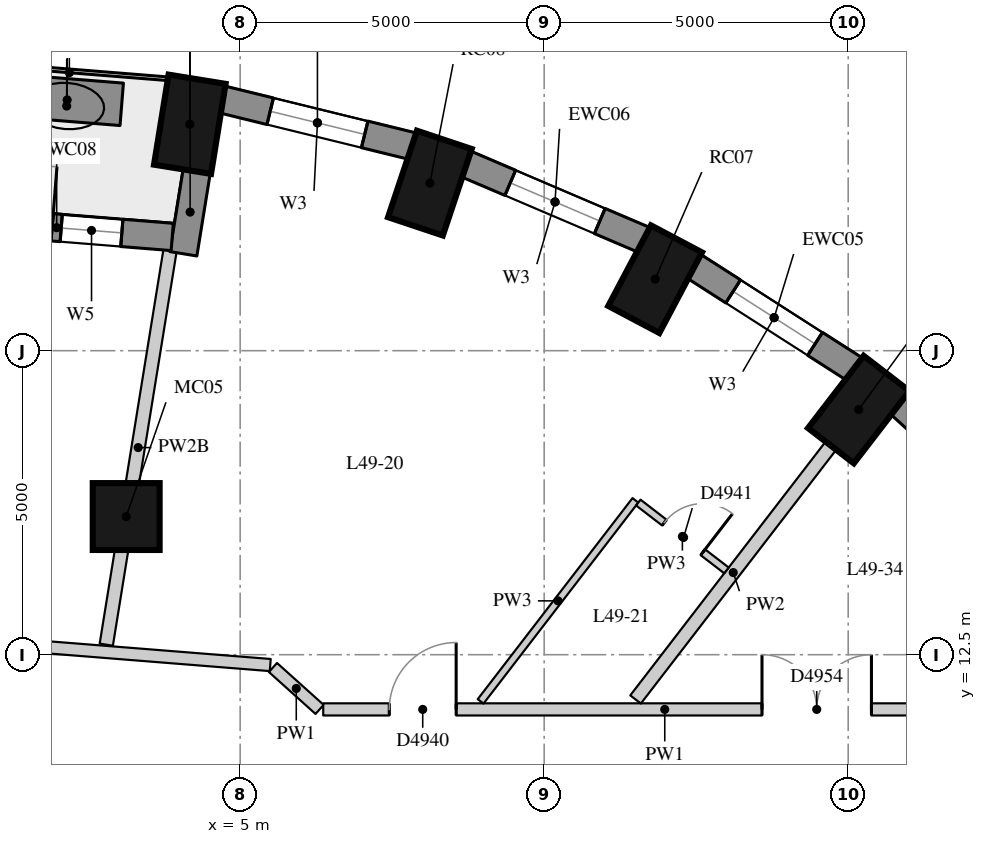
"""IFC4 building model, lengths in metres.
Left out: names, types, materials, properties, quantities, classifications, styles, units other than length and angle.
Written with IfcOpenShell. Run it as: python <this file> out.ifc"""

import sys

from ifc_helpers import new_model, si_unit, direction, frame, frame_2d, origin, origin_2d, place, context, subcontext, project, spatial, rectangle, extrude, element, fill, save


model = new_model("IFC4")
c1 = context("Model", 3, precision=1e-05, world=origin(), true_north=direction((0.0, 1.0)))
c2 = subcontext(c1, "Body", "Model", "MODEL_VIEW")
j1 = project(units=[si_unit("LENGTHUNIT", "METRE"), si_unit("PLANEANGLEUNIT", "RADIAN")], contexts=[c1])
p1 = place(None, origin())
s1 = spatial("IfcSite", under=j1, at=p1, CompositionType="ELEMENT")
p2 = place(p1, origin())
s2 = spatial("IfcBuilding", under=s1, at=p2, CompositionType="ELEMENT")
p3 = place(p2, frame((0.0, 0.0, 174.8)))
s3 = spatial("IfcBuildingStorey", under=s2, at=p3, CompositionType="ELEMENT", Elevation=174.8)
for number, where, z_axis, x_axis in (
    (1, (15.173, 16.532, 0.0), (0.0, 0.0, 1.0), (0.61, 0.792, 0.0)),
    (2, (11.825, 18.676, 0.0), (0.0, 0.0, 1.0), (0.468, 0.884, 0.0)),
    (3, (8.12, 20.256, 0.0), (0.0, 0.0, 1.0), (0.317, 0.949, 0.0)),
    (4, (4.172, 21.224, 0.0), (0.0, 0.0, 1.0), (0.16, 0.987, 0.0)),
):
    element("IfcColumn", number, at=place(p3, frame(where, z_axis=z_axis, x_axis=x_axis)), inside=s3, PredefinedType="COLUMN", context=c2, shape_type="SweptSolid", body=[
        extrude(rectangle(XDim=1.5, YDim=0.95, at=origin_2d()), origin(), (0.0, 0.0, 1.0), 3.3),
    ])
p4 = place(p3, frame((3.126, 14.772, 0.0), z_axis=(0.0, 0.0, 1.0), x_axis=(1.0, 0.0, 0.0)))
e5 = element("IfcColumn", 5, at=p4, inside=s3, PredefinedType="COLUMN", context=c2, shape_type="SweptSolid", body=[
    extrude(rectangle(XDim=1.1, YDim=1.1, at=origin_2d()), origin(), (0.0, 0.0, 1.0), 3.3),
])
p5 = place(p3, frame((18.113, 14.55, 0.0), z_axis=(0.0, 0.0, 1.0), x_axis=(-0.737808755941, 0.675009807082, 0.0)))
e6 = element("IfcWall", 6, at=p5, inside=s3, PredefinedType="SOLIDWALL", context=c2, shape_type="SweptSolid", body=[
    extrude(rectangle(XDim=3.094, YDim=0.45, at=frame_2d((1.547, 0.0))), origin(), (0.0, 0.0, 1.0), 3.02),
])
p6 = place(p3, frame((15.108, 17.193, 0.0), z_axis=(0.0, 0.0, 1.0), x_axis=(-0.842030726237, 0.539429565442, 0.0)))
e7 = element("IfcWall", 7, at=p6, inside=s3, PredefinedType="SOLIDWALL", context=c2, shape_type="SweptSolid", body=[
    extrude(rectangle(XDim=3.151, YDim=0.45, at=frame_2d((1.576, 0.0))), origin(), (0.0, 0.0, 1.0), 3.02),
])
p7 = place(p6, frame((0.776, 0.0, 0.4)))
e8 = element("IfcOpeningElement", 8, at=p7, cuts=e7, PredefinedType="OPENING", context=c2, shape_type="SweptSolid", body=[
    extrude(rectangle(XDim=1.6, YDim=1.75, at=frame_2d((0.8, 0.875))), frame((0.0, 0.235, 0.0), z_axis=(0.0, -1.0, 0.0), x_axis=(1.0, 0.0, 0.0)), (0.0, 0.0, 1.0), 0.47),
])
p8 = place(p3, frame((11.65, 19.319, 0.0), z_axis=(0.0, 0.0, 1.0), x_axis=(-0.91981046949, 0.392362969986, 0.0)))
e9 = element("IfcWall", 9, at=p8, inside=s3, PredefinedType="SOLIDWALL", context=c2, shape_type="SweptSolid", body=[
    extrude(rectangle(XDim=3.201, YDim=0.45, at=frame_2d((1.6, 0.0))), origin(), (0.0, 0.0, 1.0), 3.02),
])
p9 = place(p8, frame((0.8, 0.0, 0.4)))
e10 = element("IfcOpeningElement", 10, at=p9, cuts=e9, PredefinedType="OPENING", context=c2, shape_type="SweptSolid", body=[
    extrude(rectangle(XDim=1.6, YDim=1.75, at=frame_2d((0.8, 0.875))), frame((0.0, 0.235, 0.0), z_axis=(0.0, -1.0, 0.0), x_axis=(1.0, 0.0, 0.0)), (0.0, 0.0, 1.0), 0.47),
])
p10 = place(p3, frame((7.843, 20.862, 0.0), z_axis=(0.0, 0.0, 1.0), x_axis=(-0.971237178372, 0.238114139328, 0.0)))
e11 = element("IfcWall", 11, at=p10, inside=s3, PredefinedType="SOLIDWALL", context=c2, shape_type="SweptSolid", body=[
    extrude(rectangle(XDim=3.237, YDim=0.45, at=frame_2d((1.618, 0.0))), origin(), (0.0, 0.0, 1.0), 3.02),
])
p11 = place(p10, frame((0.818, 0.0, 0.4)))
e12 = element("IfcOpeningElement", 12, at=p11, cuts=e11, PredefinedType="OPENING", context=c2, shape_type="SweptSolid", body=[
    extrude(rectangle(XDim=1.6, YDim=1.75, at=frame_2d((0.8, 0.875))), frame((0.0, 0.235, 0.0), z_axis=(0.0, -1.0, 0.0), x_axis=(1.0, 0.0, 0.0)), (0.0, 0.0, 1.0), 0.47),
])
p12 = place(p3, frame((4.288, 20.466, 0.0), z_axis=(0.0, 0.0, 1.0), x_axis=(-0.159668705775, -0.987170656166, 0.0)))
e13 = element("IfcWall", 13, at=p12, inside=s3, PredefinedType="SOLIDWALL", context=c2, shape_type="SweptSolid", body=[
    extrude(rectangle(XDim=1.39, YDim=0.45, at=frame_2d((0.695, 0.0))), origin(), (0.0, 0.0, 1.0), 2.57),
])
p13 = place(p3, frame((3.883, 19.371, 0.0), z_axis=(0.0, 0.0, 1.0), x_axis=(-0.996792437449, 0.080030223316, 0.0)))
e14 = element("IfcWall", 14, at=p13, inside=s3, PredefinedType="SOLIDWALL", context=c2, shape_type="SweptSolid", body=[
    extrude(rectangle(XDim=3.813, YDim=0.45, at=frame_2d((1.907, 0.0))), origin(), (0.0, 0.0, 1.0), 3.02),
])
p14 = place(p13, frame((0.832, 0.0, 0.4)))
e15 = element("IfcOpeningElement", 15, at=p14, cuts=e14, PredefinedType="OPENING", context=c2, shape_type="SweptSolid", body=[
    extrude(rectangle(XDim=1.0, YDim=1.75, at=frame_2d((0.5, 0.875))), frame((0.0, 0.235, 0.0), z_axis=(0.0, -1.0, 0.0), x_axis=(1.0, 0.0, 0.0)), (0.0, 0.0, 1.0), 0.47),
])
p15 = place(p13, frame((1.982, 0.0, 0.0)))
e16 = element("IfcOpeningElement", 16, at=p15, cuts=e14, PredefinedType="OPENING", context=c2, shape_type="SweptSolid", body=[
    extrude(rectangle(XDim=1.0, YDim=2.15, at=frame_2d((0.5, 1.075))), frame((0.0, 0.235, 0.0), z_axis=(0.0, -1.0, 0.0), x_axis=(1.0, 0.0, 0.0)), (0.0, 0.0, 1.0), 0.47),
])
p16 = place(p3, frame((3.052, 21.552, 0.0), z_axis=(0.0, 0.0, 1.0), x_axis=(-0.996803623311, 0.079890778899, 0.0)))
e17 = element("IfcWall", 17, at=p16, inside=s3, PredefinedType="USERDEFINED", context=c2, shape_type="SweptSolid", body=[
    extrude(rectangle(XDim=1.8, YDim=0.7, at=frame_2d((0.9, 0.0))), origin(), (0.0, 0.0, 1.0), 0.75),
])
p17 = place(p3, frame((-2.589, 12.974, 0.0), z_axis=(0.0, 0.0, 1.0), x_axis=(0.996834299001, -0.079507108712, 0.0)))
e18 = element("IfcWall", 18, at=p17, inside=s3, PredefinedType="PARTITIONING", context=c2, shape_type="SweptSolid", body=[
    extrude(rectangle(XDim=8.11, YDim=0.2, at=frame_2d((4.055, 0.0))), origin(), (0.0, 0.0, 1.0), 3.02),
])
p18 = place(p17, frame((0.14, 0.0, 0.0)))
e19 = element("IfcOpeningElement", 19, at=p18, cuts=e18, PredefinedType="OPENING", context=c2, shape_type="SweptSolid", body=[
    extrude(rectangle(XDim=1.1, YDim=2.1, at=frame_2d((0.55, 1.05))), frame((0.0, 0.11, 0.0), z_axis=(0.0, -1.0, 0.0), x_axis=(1.0, 0.0, 0.0)), (0.0, 0.0, 1.0), 0.22),
])
p19 = place(p3, frame((5.54, 12.289, 0.0), z_axis=(0.0, 0.0, 1.0), x_axis=(0.743647325452, -0.668572101832, 0.0)))
e20 = element("IfcWall", 20, at=p19, inside=s3, PredefinedType="PARTITIONING", context=c2, shape_type="SweptSolid", body=[
    extrude(rectangle(XDim=1.031, YDim=0.2, at=frame_2d((0.515, 0.0))), origin(), (0.0, 0.0, 1.0), 3.02),
])
p20 = place(p3, frame((6.366, 11.6, 0.0), z_axis=(0.0, 0.0, 1.0), x_axis=(1.0, 0.0, 0.0)))
e21 = element("IfcWall", 21, at=p20, inside=s3, PredefinedType="PARTITIONING", context=c2, shape_type="SweptSolid", body=[
    extrude(rectangle(XDim=11.234, YDim=0.2, at=frame_2d((5.617, 0.0))), origin(), (0.0, 0.0, 1.0), 3.02),
])
p21 = place(p20, frame((1.086, 0.0, 0.0)))
e22 = element("IfcOpeningElement", 22, at=p21, cuts=e21, PredefinedType="OPENING", context=c2, shape_type="SweptSolid", body=[
    extrude(rectangle(XDim=1.1, YDim=2.1, at=frame_2d((0.55, 1.05))), frame((0.0, 0.11, 0.0), z_axis=(0.0, -1.0, 0.0), x_axis=(1.0, 0.0, 0.0)), (0.0, 0.0, 1.0), 0.22),
])
p22 = place(p20, frame((7.216, 0.0, 0.0)))
e23 = element("IfcOpeningElement", 23, at=p22, cuts=e21, PredefinedType="OPENING", context=c2, shape_type="SweptSolid", body=[
    extrude(rectangle(XDim=1.8, YDim=2.1, at=frame_2d((0.9, 1.05))), frame((0.0, 0.11, 0.0), z_axis=(0.0, -1.0, 0.0), x_axis=(1.0, 0.0, 0.0)), (0.0, 0.0, 1.0), 0.22),
])
p23 = place(p3, frame((14.716, 15.937, 0.0), z_axis=(0.0, 0.0, 1.0), x_axis=(-0.61000193202, -0.792399926131, 0.0)))
e24 = element("IfcWall", 24, at=p23, inside=s3, PredefinedType="PARTITIONING", context=c2, shape_type="SweptSolid", body=[
    extrude(rectangle(XDim=5.267, YDim=0.22, at=frame_2d((2.634, 0.0))), origin(), (0.0, 0.0, 1.0), 3.02),
])
p24 = place(p3, frame((3.847, 19.148, 0.0), z_axis=(0.0, 0.0, 1.0), x_axis=(-0.159670729912, -0.987170328773, 0.0)))
e25 = element("IfcWall", 25, at=p24, inside=s3, PredefinedType="PARTITIONING", context=c2, shape_type="SweptSolid", body=[
    extrude(rectangle(XDim=6.567, YDim=0.22, at=frame_2d((3.284, 0.0))), origin(), (0.0, 0.0, 1.0), 2.57),
])
p25 = place(p3, frame((8.955, 11.732, 0.0), z_axis=(0.0, 0.0, 1.0), x_axis=(0.609996270026, 0.79240428479, 0.0)))
e26 = element("IfcWall", 26, at=p25, inside=s3, PredefinedType="PARTITIONING", context=c2, shape_type="SweptSolid", body=[
    extrude(rectangle(XDim=4.173, YDim=0.12, at=frame_2d((2.087, 0.0))), origin(), (0.0, 0.0, 1.0), 3.02),
])
p26 = place(p3, frame((11.548, 15.002, 0.0), z_axis=(0.0, 0.0, 1.0), x_axis=(0.792445416108, -0.609942835428, 0.0)))
e27 = element("IfcWall", 27, at=p26, inside=s3, PredefinedType="PARTITIONING", context=c2, shape_type="SweptSolid", body=[
    extrude(rectangle(XDim=1.83, YDim=0.12, at=frame_2d((0.915, 0.0))), origin(), (0.0, 0.0, 1.0), 3.02),
])
p27 = place(p26, frame((0.54, 0.0, 0.0)))
e28 = element("IfcOpeningElement", 28, at=p27, cuts=e27, PredefinedType="OPENING", context=c2, shape_type="SweptSolid", body=[
    extrude(rectangle(XDim=0.8, YDim=2.1, at=frame_2d((0.4, 1.05))), frame((0.0, 0.07, 0.0), z_axis=(0.0, -1.0, 0.0), x_axis=(1.0, 0.0, 0.0)), (0.0, 0.0, 1.0), 0.14),
])
p28 = place(p7, origin())
e29 = element("IfcWindow", 29, at=p28, inside=s3, PartitioningType="SINGLE_PANEL", PredefinedType="WINDOW", context=c2, shape_type="SweptSolid", body=[
    extrude(rectangle(XDim=1.6, YDim=1.75, at=frame_2d((0.8, 0.875))), frame((0.0, 0.035, 0.0), z_axis=(0.0, -1.0, 0.0), x_axis=(1.0, 0.0, 0.0)), (0.0, 0.0, 1.0), 0.06),
])
fill(e8, e29)
p29 = place(p9, origin())
e30 = element("IfcWindow", 30, at=p29, inside=s3, PartitioningType="SINGLE_PANEL", PredefinedType="WINDOW", context=c2, shape_type="SweptSolid", body=[
    extrude(rectangle(XDim=1.6, YDim=1.75, at=frame_2d((0.8, 0.875))), frame((0.0, 0.035, 0.0), z_axis=(0.0, -1.0, 0.0), x_axis=(1.0, 0.0, 0.0)), (0.0, 0.0, 1.0), 0.06),
])
fill(e10, e30)
p30 = place(p11, origin())
e31 = element("IfcWindow", 31, at=p30, inside=s3, PartitioningType="SINGLE_PANEL", PredefinedType="WINDOW", context=c2, shape_type="SweptSolid", body=[
    extrude(rectangle(XDim=1.6, YDim=1.75, at=frame_2d((0.8, 0.875))), frame((0.0, 0.035, 0.0), z_axis=(0.0, -1.0, 0.0), x_axis=(1.0, 0.0, 0.0)), (0.0, 0.0, 1.0), 0.06),
])
fill(e12, e31)
p31 = place(p14, origin())
e32 = element("IfcWindow", 32, at=p31, inside=s3, PartitioningType="SINGLE_PANEL", PredefinedType="WINDOW", context=c2, shape_type="SweptSolid", body=[
    extrude(rectangle(XDim=1.0, YDim=1.75, at=frame_2d((0.5, 0.875))), frame((0.0, 0.035, 0.0), z_axis=(0.0, -1.0, 0.0), x_axis=(1.0, 0.0, 0.0)), (0.0, 0.0, 1.0), 0.06),
])
fill(e15, e32)
p32 = place(p15, frame((1.0, 0.0, 0.0), z_axis=(0.0, 0.0, 1.0), x_axis=(-1.0, 0.0, 0.0)))
e33 = element("IfcDoor", 33, at=p32, inside=s3, OperationType="SINGLE_SWING_RIGHT", PredefinedType="DOOR", context=c2, shape_type="SweptSolid", body=[
    extrude(rectangle(XDim=1.0, YDim=2.15, at=frame_2d((0.5, 1.075))), frame((0.0, 0.075, 0.0), z_axis=(0.0, -1.0, 0.0), x_axis=(1.0, 0.0, 0.0)), (0.0, 0.0, 1.0), 0.05),
])
fill(e16, e33)
p33 = place(p21, origin())
e34 = element("IfcDoor", 34, at=p33, inside=s3, OperationType="SINGLE_SWING_RIGHT", PredefinedType="DOOR", context=c2, shape_type="SweptSolid", body=[
    extrude(rectangle(XDim=1.1, YDim=2.1, at=frame_2d((0.55, 1.05))), frame((0.0, 0.025, 0.0), z_axis=(0.0, -1.0, 0.0), x_axis=(1.0, 0.0, 0.0)), (0.0, 0.0, 1.0), 0.05),
])
fill(e22, e34)
p34 = place(p27, origin())
e35 = element("IfcDoor", 35, at=p34, inside=s3, OperationType="SINGLE_SWING_RIGHT", PredefinedType="DOOR", context=c2, shape_type="SweptSolid", body=[
    extrude(rectangle(XDim=0.8, YDim=2.1, at=frame_2d((0.4, 1.05))), frame((0.0, 0.025, 0.0), z_axis=(0.0, -1.0, 0.0), x_axis=(1.0, 0.0, 0.0)), (0.0, 0.0, 1.0), 0.05),
])
fill(e28, e35)
p35 = place(p22, origin())
e36 = element("IfcDoor", 36, at=p35, inside=s3, OperationType="DOUBLE_DOOR_SINGLE_SWING", PredefinedType="DOOR", context=c2, shape_type="SweptSolid", body=[
    extrude(rectangle(XDim=1.8, YDim=2.1, at=frame_2d((0.9, 1.05))), frame((0.0, 0.025, 0.0), z_axis=(0.0, -1.0, 0.0), x_axis=(1.0, 0.0, 0.0)), (0.0, 0.0, 1.0), 0.05),
])
fill(e23, e36)
save(model, sys.argv[1])
